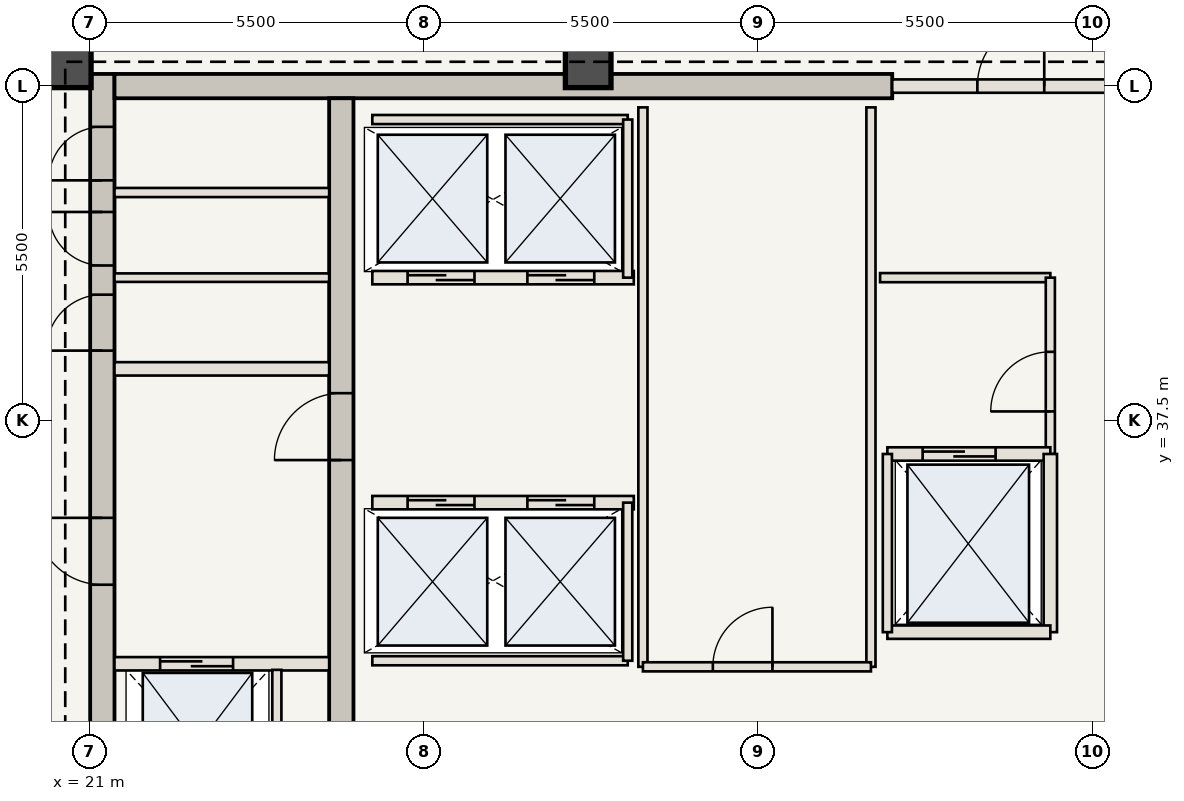
"""IFC4 building model, lengths in metres.
Left out: names, types, materials, properties, quantities, classifications, styles, units other than length and angle.
Written with IfcOpenShell. Run it as: python <this file> out.ifc"""

import sys

from ifc_helpers import new_model, si_unit, direction, frame, frame_2d, origin, origin_2d, place, context, subcontext, project, spatial, rectangle, extrude, element, fill, save


model = new_model("IFC4")
c1 = context("Model", 3, precision=1e-05, world=origin(), true_north=direction((0.0, 1.0)))
c2 = subcontext(c1, "Body", "Model", "MODEL_VIEW")
j1 = project(units=[si_unit("LENGTHUNIT", "METRE"), si_unit("PLANEANGLEUNIT", "RADIAN")], contexts=[c1])
p1 = place(None, origin())
s1 = spatial("IfcSite", under=j1, at=p1, CompositionType="ELEMENT")
p2 = place(p1, origin())
s2 = spatial("IfcBuilding", under=s1, at=p2, CompositionType="ELEMENT")
p3 = place(p2, frame((0.0, 0.0, 296.8)))
s3 = spatial("IfcBuildingStorey", under=s2, at=p3, CompositionType="ELEMENT", Elevation=296.8)
p4 = place(p3, frame((21.21, 30.6, 0.0), z_axis=(0.0, 0.0, 1.0), x_axis=(0.0, 1.0, 0.0)))
e1 = element("IfcWall", 1, at=p4, inside=s3, PredefinedType="SHEAR", context=c2, shape_type="SweptSolid", body=[
    extrude(rectangle(XDim=12.6, YDim=0.4, at=frame_2d((6.3, 0.0))), origin(), (0.0, 0.0, 1.0), 3.85),
])
p5 = place(p4, frame((4.2, 0.0, 0.0)))
e2 = element("IfcOpeningElement", 2, at=p5, cuts=e1, PredefinedType="OPENING", context=c2, shape_type="SweptSolid", body=[
    extrude(rectangle(XDim=1.1, YDim=2.15, at=frame_2d((0.55, 1.075))), frame((0.0, 0.21, 0.0), z_axis=(0.0, -1.0, 0.0), x_axis=(1.0, 0.0, 0.0)), (0.0, 0.0, 1.0), 0.42),
])
p6 = place(p4, frame((8.05, 0.0, 0.0)))
e3 = element("IfcOpeningElement", 3, at=p6, cuts=e1, PredefinedType="OPENING", context=c2, shape_type="SweptSolid", body=[
    extrude(rectangle(XDim=0.92, YDim=2.1, at=frame_2d((0.46, 1.05))), frame((0.0, 0.21, 0.0), z_axis=(0.0, -1.0, 0.0), x_axis=(1.0, 0.0, 0.0)), (0.0, 0.0, 1.0), 0.42),
])
p7 = place(p4, frame((9.45, 0.0, 0.0)))
e4 = element("IfcOpeningElement", 4, at=p7, cuts=e1, PredefinedType="OPENING", context=c2, shape_type="SweptSolid", body=[
    extrude(rectangle(XDim=0.88, YDim=2.1, at=frame_2d((0.44, 1.05))), frame((0.0, 0.21, 0.0), z_axis=(0.0, -1.0, 0.0), x_axis=(1.0, 0.0, 0.0)), (0.0, 0.0, 1.0), 0.42),
])
p8 = place(p4, frame((10.85, 0.0, 0.0)))
e5 = element("IfcOpeningElement", 5, at=p8, cuts=e1, PredefinedType="OPENING", context=c2, shape_type="SweptSolid", body=[
    extrude(rectangle(XDim=0.88, YDim=2.1, at=frame_2d((0.44, 1.05))), frame((0.0, 0.21, 0.0), z_axis=(0.0, -1.0, 0.0), x_axis=(1.0, 0.0, 0.0)), (0.0, 0.0, 1.0), 0.42),
])
p9 = place(p3, frame((21.41, 43.0, 0.0), z_axis=(0.0, 0.0, 1.0), x_axis=(1.0, 0.0, 0.0)))
e6 = element("IfcWall", 6, at=p9, inside=s3, PredefinedType="SHEAR", context=c2, shape_type="SweptSolid", body=[
    extrude(rectangle(XDim=12.79, YDim=0.4, at=frame_2d((6.395, 0.0))), origin(), (0.0, 0.0, 1.0), 3.85),
])
p10 = place(p3, frame((25.14, 30.6, 0.0), z_axis=(0.0, 0.0, 1.0), x_axis=(0.0, 1.0, 0.0)))
e7 = element("IfcWall", 7, at=p10, inside=s3, PredefinedType="SHEAR", context=c2, shape_type="SweptSolid", body=[
    extrude(rectangle(XDim=12.2, YDim=0.4, at=frame_2d((6.1, 0.0))), origin(), (0.0, 0.0, 1.0), 3.85),
])
p11 = place(p10, frame((6.25, 0.0, 0.0)))
e8 = element("IfcOpeningElement", 8, at=p11, cuts=e7, PredefinedType="OPENING", context=c2, shape_type="SweptSolid", body=[
    extrude(rectangle(XDim=1.1, YDim=2.15, at=frame_2d((0.55, 1.075))), frame((0.0, 0.21, 0.0), z_axis=(0.0, -1.0, 0.0), x_axis=(1.0, 0.0, 0.0)), (0.0, 0.0, 1.0), 0.42),
])
for number, where, z_axis, x_axis in (
    (9, (29.2, 43.35, 0.0), (0.0, 0.0, 1.0), (1.0, 0.0, 0.0)),
    (10, (20.65, 43.35, 0.0), (0.0, 0.0, 1.0), (1.0, 0.0, 0.0)),
):
    element("IfcColumn", number, at=place(p3, frame(where, z_axis=z_axis, x_axis=x_axis)), inside=s3, PredefinedType="COLUMN", context=c2, shape_type="SweptSolid", body=[
        extrude(rectangle(XDim=0.75, YDim=0.75, at=origin_2d()), origin(), (0.0, 0.0, 1.0), 3.85),
    ])
p12 = place(p3, frame((21.41, 33.5, 0.0), z_axis=(0.0, 0.0, 1.0), x_axis=(1.0, 0.0, 0.0)))
e11 = element("IfcWall", 11, at=p12, inside=s3, PredefinedType="STANDARD", context=c2, shape_type="SweptSolid", body=[
    extrude(rectangle(XDim=3.53, YDim=0.22, at=frame_2d((1.765, 0.0))), origin(), (0.0, 0.0, 1.0), 3.685),
])
p13 = place(p12, frame((0.75, 0.0, 0.0)))
e12 = element("IfcOpeningElement", 12, at=p13, cuts=e11, PredefinedType="OPENING", context=c2, shape_type="SweptSolid", body=[
    extrude(rectangle(XDim=1.2, YDim=2.2, at=frame_2d((0.6, 1.1))), frame((0.0, 0.12, 0.0), z_axis=(0.0, -1.0, 0.0), x_axis=(1.0, 0.0, 0.0)), (0.0, 0.0, 1.0), 0.24),
])
p14 = place(p3, frame((24.08, 30.75, 0.0), z_axis=(0.0, 0.0, 1.0), x_axis=(0.0, 1.0, 0.0)))
e13 = element("IfcWall", 13, at=p14, inside=s3, PredefinedType="STANDARD", context=c2, shape_type="SweptSolid", body=[
    extrude(rectangle(XDim=2.65, YDim=0.15, at=frame_2d((1.325, 0.0))), origin(), (0.0, 0.0, 1.0), 3.685),
])
p15 = place(p3, frame((21.41, 38.35, 0.0), z_axis=(0.0, 0.0, 1.0), x_axis=(1.0, 0.0, 0.0)))
e14 = element("IfcWall", 14, at=p15, inside=s3, PredefinedType="STANDARD", context=c2, shape_type="SweptSolid", body=[
    extrude(rectangle(XDim=3.53, YDim=0.22, at=frame_2d((1.765, 0.0))), origin(), (0.0, 0.0, 1.0), 3.685),
])
p16 = place(p3, frame((21.41, 39.85, 0.0), z_axis=(0.0, 0.0, 1.0), x_axis=(1.0, 0.0, 0.0)))
e15 = element("IfcWall", 15, at=p16, inside=s3, PredefinedType="STANDARD", context=c2, shape_type="SweptSolid", body=[
    extrude(rectangle(XDim=3.53, YDim=0.14, at=frame_2d((1.765, 0.0))), origin(), (0.0, 0.0, 1.0), 3.685),
])
p17 = place(p3, frame((21.41, 41.25, 0.0), z_axis=(0.0, 0.0, 1.0), x_axis=(1.0, 0.0, 0.0)))
e16 = element("IfcWall", 16, at=p17, inside=s3, PredefinedType="STANDARD", context=c2, shape_type="SweptSolid", body=[
    extrude(rectangle(XDim=3.53, YDim=0.15, at=frame_2d((1.765, 0.0))), origin(), (0.0, 0.0, 1.0), 3.685),
])
p18 = place(p3, frame((34.0, 39.85, 0.0), z_axis=(0.0, 0.0, 1.0), x_axis=(1.0, 0.0, 0.0)))
e17 = element("IfcWall", 17, at=p18, inside=s3, PredefinedType="STANDARD", context=c2, shape_type="SweptSolid", body=[
    extrude(rectangle(XDim=2.8, YDim=0.15, at=frame_2d((1.4, 0.0))), origin(), (0.0, 0.0, 1.0), 3.685),
])
p19 = place(p3, frame((36.8, 36.95, 0.0), z_axis=(0.0, 0.0, 1.0), x_axis=(0.0, 1.0, 0.0)))
e18 = element("IfcWall", 18, at=p19, inside=s3, PredefinedType="STANDARD", context=c2, shape_type="SweptSolid", body=[
    extrude(rectangle(XDim=2.9, YDim=0.15, at=frame_2d((1.45, 0.0))), origin(), (0.0, 0.0, 1.0), 3.685),
])
p20 = place(p19, frame((0.7, 0.0, 0.0)))
e19 = element("IfcOpeningElement", 19, at=p20, cuts=e18, PredefinedType="OPENING", context=c2, shape_type="SweptSolid", body=[
    extrude(rectangle(XDim=0.98, YDim=2.2, at=frame_2d((0.49, 1.1))), frame((0.0, 0.085, 0.0), z_axis=(0.0, -1.0, 0.0), x_axis=(1.0, 0.0, 0.0)), (0.0, 0.0, 1.0), 0.17),
])
p21 = place(p3, frame((25.65, 36.15, 0.0), z_axis=(0.0, 0.0, 1.0), x_axis=(1.0, 0.0, 0.0)))
e20 = element("IfcWall", 20, at=p21, inside=s3, PredefinedType="STANDARD", context=c2, shape_type="SweptSolid", body=[
    extrude(rectangle(XDim=4.3, YDim=0.22, at=frame_2d((2.15, 0.0))), origin(), (0.0, 0.0, 1.0), 3.685),
])
p22 = place(p21, frame((0.58, 0.0, 0.0)))
e21 = element("IfcOpeningElement", 21, at=p22, cuts=e20, PredefinedType="OPENING", context=c2, shape_type="SweptSolid", body=[
    extrude(rectangle(XDim=1.1, YDim=2.15, at=frame_2d((0.55, 1.075))), frame((0.0, 0.12, 0.0), z_axis=(0.0, -1.0, 0.0), x_axis=(1.0, 0.0, 0.0)), (0.0, 0.0, 1.0), 0.24),
])
p23 = place(p21, frame((2.55, 0.0, 0.0)))
e22 = element("IfcOpeningElement", 22, at=p23, cuts=e20, PredefinedType="OPENING", context=c2, shape_type="SweptSolid", body=[
    extrude(rectangle(XDim=1.1, YDim=2.15, at=frame_2d((0.55, 1.075))), frame((0.0, 0.12, 0.0), z_axis=(0.0, -1.0, 0.0), x_axis=(1.0, 0.0, 0.0)), (0.0, 0.0, 1.0), 0.24),
])
p24 = place(p3, frame((25.65, 33.55, 0.0), z_axis=(0.0, 0.0, 1.0), x_axis=(1.0, 0.0, 0.0)))
e23 = element("IfcWall", 23, at=p24, inside=s3, PredefinedType="STANDARD", context=c2, shape_type="SweptSolid", body=[
    extrude(rectangle(XDim=4.2, YDim=0.15, at=frame_2d((2.1, 0.0))), origin(), (0.0, 0.0, 1.0), 3.685),
])
p25 = place(p3, frame((29.85, 33.55, 0.0), z_axis=(0.0, 0.0, 1.0), x_axis=(0.0, 1.0, 0.0)))
e24 = element("IfcWall", 24, at=p25, inside=s3, PredefinedType="STANDARD", context=c2, shape_type="SweptSolid", body=[
    extrude(rectangle(XDim=2.6, YDim=0.15, at=frame_2d((1.3, 0.0))), origin(), (0.0, 0.0, 1.0), 3.685),
])
p26 = place(p3, frame((25.65, 39.85, 0.0), z_axis=(0.0, 0.0, 1.0), x_axis=(1.0, 0.0, 0.0)))
e25 = element("IfcWall", 25, at=p26, inside=s3, PredefinedType="STANDARD", context=c2, shape_type="SweptSolid", body=[
    extrude(rectangle(XDim=4.3, YDim=0.22, at=frame_2d((2.15, 0.0))), origin(), (0.0, 0.0, 1.0), 3.685),
])
p27 = place(p26, frame((0.58, 0.0, 0.0)))
e26 = element("IfcOpeningElement", 26, at=p27, cuts=e25, PredefinedType="OPENING", context=c2, shape_type="SweptSolid", body=[
    extrude(rectangle(XDim=1.1, YDim=2.15, at=frame_2d((0.55, 1.075))), frame((0.0, 0.12, 0.0), z_axis=(0.0, -1.0, 0.0), x_axis=(1.0, 0.0, 0.0)), (0.0, 0.0, 1.0), 0.24),
])
p28 = place(p26, frame((2.55, 0.0, 0.0)))
e27 = element("IfcOpeningElement", 27, at=p28, cuts=e25, PredefinedType="OPENING", context=c2, shape_type="SweptSolid", body=[
    extrude(rectangle(XDim=1.1, YDim=2.15, at=frame_2d((0.55, 1.075))), frame((0.0, 0.12, 0.0), z_axis=(0.0, -1.0, 0.0), x_axis=(1.0, 0.0, 0.0)), (0.0, 0.0, 1.0), 0.24),
])
p29 = place(p3, frame((25.65, 42.45, 0.0), z_axis=(0.0, 0.0, 1.0), x_axis=(1.0, 0.0, 0.0)))
e28 = element("IfcWall", 28, at=p29, inside=s3, PredefinedType="STANDARD", context=c2, shape_type="SweptSolid", body=[
    extrude(rectangle(XDim=4.2, YDim=0.15, at=frame_2d((2.1, 0.0))), origin(), (0.0, 0.0, 1.0), 3.685),
])
p30 = place(p3, frame((29.85, 39.85, 0.0), z_axis=(0.0, 0.0, 1.0), x_axis=(0.0, 1.0, 0.0)))
e29 = element("IfcWall", 29, at=p30, inside=s3, PredefinedType="STANDARD", context=c2, shape_type="SweptSolid", body=[
    extrude(rectangle(XDim=2.6, YDim=0.15, at=frame_2d((1.3, 0.0))), origin(), (0.0, 0.0, 1.0), 3.685),
])
for number, where, z_axis, x_axis in (
    (30, (30.1, 33.45, 0.0), (0.0, 0.0, 1.0), (0.0, 1.0, 0.0)),
    (31, (33.85, 33.45, 0.0), (0.0, 0.0, 1.0), (0.0, 1.0, 0.0)),
):
    element("IfcWall", number, at=place(p3, frame(where, z_axis=z_axis, x_axis=x_axis)), inside=s3, PredefinedType="STANDARD", context=c2, shape_type="SweptSolid", body=[
        extrude(rectangle(XDim=9.2, YDim=0.15, at=frame_2d((4.6, 0.0))), origin(), (0.0, 0.0, 1.0), 3.685),
    ])
p31 = place(p3, frame((30.1, 33.45, 0.0), z_axis=(0.0, 0.0, 1.0), x_axis=(1.0, 0.0, 0.0)))
e32 = element("IfcWall", 32, at=p31, inside=s3, PredefinedType="STANDARD", context=c2, shape_type="SweptSolid", body=[
    extrude(rectangle(XDim=3.75, YDim=0.15, at=frame_2d((1.875, 0.0))), origin(), (0.0, 0.0, 1.0), 3.685),
])
p32 = place(p31, frame((1.15, 0.0, 0.0)))
e33 = element("IfcOpeningElement", 33, at=p32, cuts=e32, PredefinedType="OPENING", context=c2, shape_type="SweptSolid", body=[
    extrude(rectangle(XDim=0.98, YDim=2.2, at=frame_2d((0.49, 1.1))), frame((0.0, 0.085, 0.0), z_axis=(0.0, -1.0, 0.0), x_axis=(1.0, 0.0, 0.0)), (0.0, 0.0, 1.0), 0.17),
])
p33 = place(p3, frame((34.2, 43.0, 0.0), z_axis=(0.0, 0.0, 1.0), x_axis=(1.0, 0.0, 0.0)))
e34 = element("IfcWall", 34, at=p33, inside=s3, PredefinedType="STANDARD", context=c2, shape_type="SweptSolid", body=[
    extrude(rectangle(XDim=3.55, YDim=0.22, at=frame_2d((1.775, 0.0))), origin(), (0.0, 0.0, 1.0), 3.685),
])
p34 = place(p33, frame((1.4, 0.0, 0.0)))
e35 = element("IfcOpeningElement", 35, at=p34, cuts=e34, PredefinedType="OPENING", context=c2, shape_type="SweptSolid", body=[
    extrude(rectangle(XDim=1.1, YDim=2.15, at=frame_2d((0.55, 1.075))), frame((0.0, 0.12, 0.0), z_axis=(0.0, -1.0, 0.0), x_axis=(1.0, 0.0, 0.0)), (0.0, 0.0, 1.0), 0.24),
])
p35 = place(p3, frame((34.12, 36.95, 0.0), z_axis=(0.0, 0.0, 1.0), x_axis=(1.0, 0.0, 0.0)))
e36 = element("IfcWall", 36, at=p35, inside=s3, PredefinedType="STANDARD", context=c2, shape_type="SweptSolid", body=[
    extrude(rectangle(XDim=2.68, YDim=0.22, at=frame_2d((1.34, 0.0))), origin(), (0.0, 0.0, 1.0), 3.685),
])
p36 = place(p35, frame((0.58, 0.0, 0.0)))
e37 = element("IfcOpeningElement", 37, at=p36, cuts=e36, PredefinedType="OPENING", context=c2, shape_type="SweptSolid", body=[
    extrude(rectangle(XDim=1.2, YDim=2.2, at=frame_2d((0.6, 1.1))), frame((0.0, 0.12, 0.0), z_axis=(0.0, -1.0, 0.0), x_axis=(1.0, 0.0, 0.0)), (0.0, 0.0, 1.0), 0.24),
])
p37 = place(p3, frame((36.8, 34.02, 0.0), z_axis=(0.0, 0.0, 1.0), x_axis=(0.0, 1.0, 0.0)))
e38 = element("IfcWall", 38, at=p37, inside=s3, PredefinedType="STANDARD", context=c2, shape_type="SweptSolid", body=[
    extrude(rectangle(XDim=2.93, YDim=0.22, at=frame_2d((1.465, 0.0))), origin(), (0.0, 0.0, 1.0), 3.685),
])
p38 = place(p3, frame((34.12, 34.02, 0.0), z_axis=(0.0, 0.0, 1.0), x_axis=(1.0, 0.0, 0.0)))
e39 = element("IfcWall", 39, at=p38, inside=s3, PredefinedType="STANDARD", context=c2, shape_type="SweptSolid", body=[
    extrude(rectangle(XDim=2.68, YDim=0.22, at=frame_2d((1.34, 0.0))), origin(), (0.0, 0.0, 1.0), 3.685),
])
p39 = place(p3, frame((34.12, 34.02, 0.0), z_axis=(0.0, 0.0, 1.0), x_axis=(0.0, 1.0, 0.0)))
e40 = element("IfcWall", 40, at=p39, inside=s3, PredefinedType="STANDARD", context=c2, shape_type="SweptSolid", body=[
    extrude(rectangle(XDim=2.93, YDim=0.15, at=frame_2d((1.465, 0.0))), origin(), (0.0, 0.0, 1.0), 3.685),
])
p40 = place(p5, origin())
e41 = element("IfcDoor", 41, at=p40, inside=s3, OperationType="SINGLE_SWING_RIGHT", PredefinedType="DOOR", context=c2, shape_type="SweptSolid", body=[
    extrude(rectangle(XDim=1.1, YDim=2.15, at=frame_2d((0.55, 1.075))), frame((0.0, 0.025, 0.0), z_axis=(0.0, -1.0, 0.0), x_axis=(1.0, 0.0, 0.0)), (0.0, 0.0, 1.0), 0.05),
])
fill(e2, e41)
p41 = place(p11, origin())
e42 = element("IfcDoor", 42, at=p41, inside=s3, OperationType="SINGLE_SWING_LEFT", PredefinedType="DOOR", context=c2, shape_type="SweptSolid", body=[
    extrude(rectangle(XDim=1.1, YDim=2.15, at=frame_2d((0.55, 1.075))), frame((0.0, 0.025, 0.0), z_axis=(0.0, -1.0, 0.0), x_axis=(1.0, 0.0, 0.0)), (0.0, 0.0, 1.0), 0.05),
])
fill(e8, e42)
p42 = place(p6, origin())
e43 = element("IfcDoor", 43, at=p42, inside=s3, OperationType="SINGLE_SWING_LEFT", PredefinedType="DOOR", context=c2, shape_type="SweptSolid", body=[
    extrude(rectangle(XDim=0.92, YDim=2.1, at=frame_2d((0.46, 1.05))), frame((0.0, 0.025, 0.0), z_axis=(0.0, -1.0, 0.0), x_axis=(1.0, 0.0, 0.0)), (0.0, 0.0, 1.0), 0.05),
])
fill(e3, e43)
p43 = place(p7, origin())
e44 = element("IfcDoor", 44, at=p43, inside=s3, OperationType="SINGLE_SWING_RIGHT", PredefinedType="DOOR", context=c2, shape_type="SweptSolid", body=[
    extrude(rectangle(XDim=0.88, YDim=2.1, at=frame_2d((0.44, 1.05))), frame((0.0, 0.025, 0.0), z_axis=(0.0, -1.0, 0.0), x_axis=(1.0, 0.0, 0.0)), (0.0, 0.0, 1.0), 0.05),
])
fill(e4, e44)
p44 = place(p8, origin())
e45 = element("IfcDoor", 45, at=p44, inside=s3, OperationType="SINGLE_SWING_LEFT", PredefinedType="DOOR", context=c2, shape_type="SweptSolid", body=[
    extrude(rectangle(XDim=0.88, YDim=2.1, at=frame_2d((0.44, 1.05))), frame((0.0, 0.025, 0.0), z_axis=(0.0, -1.0, 0.0), x_axis=(1.0, 0.0, 0.0)), (0.0, 0.0, 1.0), 0.05),
])
fill(e5, e45)
p45 = place(p13, origin())
e46 = element("IfcDoor", 46, at=p45, inside=s3, OperationType="DOUBLE_DOOR_SLIDING", PredefinedType="DOOR", context=c2, shape_type="SweptSolid", body=[
    extrude(rectangle(XDim=1.2, YDim=2.2, at=frame_2d((0.6, 1.1))), frame((0.0, 0.025, 0.0), z_axis=(0.0, -1.0, 0.0), x_axis=(1.0, 0.0, 0.0)), (0.0, 0.0, 1.0), 0.05),
])
fill(e12, e46)
p46 = place(p20, origin())
e47 = element("IfcDoor", 47, at=p46, inside=s3, OperationType="SINGLE_SWING_LEFT", PredefinedType="DOOR", context=c2, shape_type="SweptSolid", body=[
    extrude(rectangle(XDim=0.98, YDim=2.2, at=frame_2d((0.49, 1.1))), frame((0.0, 0.025, 0.0), z_axis=(0.0, -1.0, 0.0), x_axis=(1.0, 0.0, 0.0)), (0.0, 0.0, 1.0), 0.05),
])
fill(e19, e47)
p47 = place(p22, origin())
e48 = element("IfcDoor", 48, at=p47, inside=s3, OperationType="DOUBLE_DOOR_SLIDING", PredefinedType="DOOR", context=c2, shape_type="SweptSolid", body=[
    extrude(rectangle(XDim=1.1, YDim=2.15, at=frame_2d((0.55, 1.075))), frame((0.0, 0.025, 0.0), z_axis=(0.0, -1.0, 0.0), x_axis=(1.0, 0.0, 0.0)), (0.0, 0.0, 1.0), 0.05),
])
fill(e21, e48)
p48 = place(p23, origin())
e49 = element("IfcDoor", 49, at=p48, inside=s3, OperationType="DOUBLE_DOOR_SLIDING", PredefinedType="DOOR", context=c2, shape_type="SweptSolid", body=[
    extrude(rectangle(XDim=1.1, YDim=2.15, at=frame_2d((0.55, 1.075))), frame((0.0, 0.025, 0.0), z_axis=(0.0, -1.0, 0.0), x_axis=(1.0, 0.0, 0.0)), (0.0, 0.0, 1.0), 0.05),
])
fill(e22, e49)
p49 = place(p27, origin())
e50 = element("IfcDoor", 50, at=p49, inside=s3, OperationType="DOUBLE_DOOR_SLIDING", PredefinedType="DOOR", context=c2, shape_type="SweptSolid", body=[
    extrude(rectangle(XDim=1.1, YDim=2.15, at=frame_2d((0.55, 1.075))), frame((0.0, 0.025, 0.0), z_axis=(0.0, -1.0, 0.0), x_axis=(1.0, 0.0, 0.0)), (0.0, 0.0, 1.0), 0.05),
])
fill(e26, e50)
p50 = place(p28, origin())
e51 = element("IfcDoor", 51, at=p50, inside=s3, OperationType="DOUBLE_DOOR_SLIDING", PredefinedType="DOOR", context=c2, shape_type="SweptSolid", body=[
    extrude(rectangle(XDim=1.1, YDim=2.15, at=frame_2d((0.55, 1.075))), frame((0.0, 0.025, 0.0), z_axis=(0.0, -1.0, 0.0), x_axis=(1.0, 0.0, 0.0)), (0.0, 0.0, 1.0), 0.05),
])
fill(e27, e51)
p51 = place(p32, origin())
e52 = element("IfcDoor", 52, at=p51, inside=s3, OperationType="SINGLE_SWING_RIGHT", PredefinedType="DOOR", context=c2, shape_type="SweptSolid", body=[
    extrude(rectangle(XDim=0.98, YDim=2.2, at=frame_2d((0.49, 1.1))), frame((0.0, 0.025, 0.0), z_axis=(0.0, -1.0, 0.0), x_axis=(1.0, 0.0, 0.0)), (0.0, 0.0, 1.0), 0.05),
])
fill(e33, e52)
p52 = place(p34, origin())
e53 = element("IfcDoor", 53, at=p52, inside=s3, OperationType="SINGLE_SWING_RIGHT", PredefinedType="DOOR", context=c2, shape_type="SweptSolid", body=[
    extrude(rectangle(XDim=1.1, YDim=2.15, at=frame_2d((0.55, 1.075))), frame((0.0, 0.025, 0.0), z_axis=(0.0, -1.0, 0.0), x_axis=(1.0, 0.0, 0.0)), (0.0, 0.0, 1.0), 0.05),
])
fill(e35, e53)
p53 = place(p36, origin())
e54 = element("IfcDoor", 54, at=p53, inside=s3, OperationType="DOUBLE_DOOR_SLIDING", PredefinedType="DOOR", context=c2, shape_type="SweptSolid", body=[
    extrude(rectangle(XDim=1.2, YDim=2.2, at=frame_2d((0.6, 1.1))), frame((0.0, 0.025, 0.0), z_axis=(0.0, -1.0, 0.0), x_axis=(1.0, 0.0, 0.0)), (0.0, 0.0, 1.0), 0.05),
])
fill(e37, e54)
save(model, sys.argv[1])
